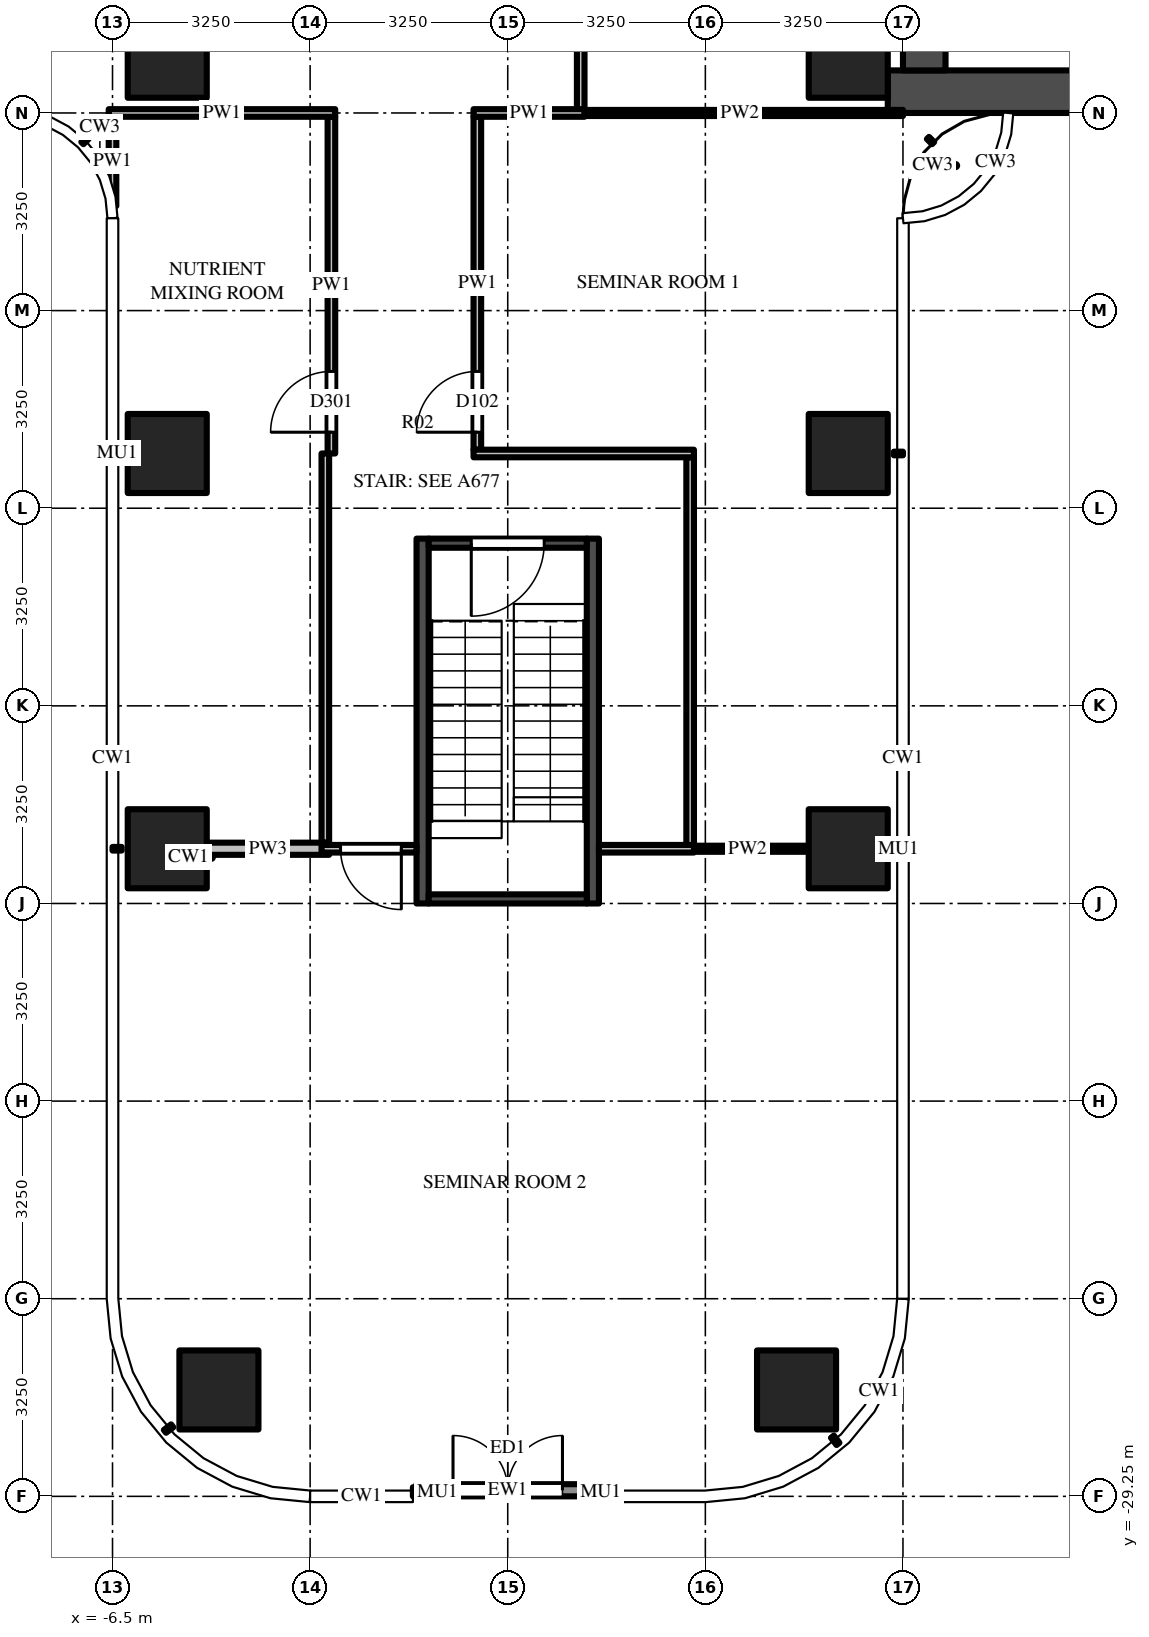
"""IFC4 building model, lengths in metres.
Left out: names, types, materials, properties, quantities, classifications, styles, units other than length and angle.
Written with IfcOpenShell. Run it as: python <this file> out.ifc"""

import sys

from ifc_helpers import new_model, si_unit, direction, frame, frame_2d, origin, origin_2d, place, context, subcontext, project, spatial, rectangle, extrude, source, transform, mapped, element, fill, save


model = new_model("IFC4")
c1 = context("Model", 3, precision=1e-05, world=origin(), true_north=direction((0.0, 1.0)))
c2 = subcontext(c1, "Body", "Model", "MODEL_VIEW")
j1 = project(units=[si_unit("LENGTHUNIT", "METRE"), si_unit("PLANEANGLEUNIT", "RADIAN")], contexts=[c1])
p1 = place(None, origin())
s1 = spatial("IfcSite", under=j1, at=p1, CompositionType="ELEMENT")
p2 = place(p1, origin())
s2 = spatial("IfcBuilding", under=s1, at=p2, CompositionType="ELEMENT")
p3 = place(p2, frame((0.0, 0.0, 97.5)))
s3 = spatial("IfcBuildingStorey", under=s2, at=p3, CompositionType="ELEMENT", Elevation=97.5)
m1 = source(origin(), c2, "Body", "SweptSolid", [
    extrude(rectangle(XDim=1.3, YDim=1.3, at=origin_2d()), origin(), (0.0, 0.0, 1.0), 4.5),
])
for number, where, z_axis, x_axis in (
    (1, (5.6, -5.6, 0.0), (0.0, 0.0, 1.0), (1.0, 0.0, 0.0)),
    (2, (-5.6, -5.6, 0.0), (0.0, 0.0, 1.0), (1.0, 0.0, 0.0)),
    (3, (5.6, -12.1, 0.0), (0.0, 0.0, 1.0), (1.0, 0.0, 0.0)),
    (4, (5.6, -18.6, 0.0), (0.0, 0.0, 1.0), (1.0, 0.0, 0.0)),
    (5, (4.75, -27.5, 0.0), (0.0, 0.0, 1.0), (1.0, 0.0, 0.0)),
    (6, (-5.6, -12.1, 0.0), (0.0, 0.0, 1.0), (1.0, 0.0, 0.0)),
    (7, (-5.6, -18.6, 0.0), (0.0, 0.0, 1.0), (1.0, 0.0, 0.0)),
    (8, (-4.75, -27.5, 0.0), (0.0, 0.0, 1.0), (1.0, 0.0, 0.0)),
):
    element("IfcColumn", number, at=place(p3, frame(where, z_axis=z_axis, x_axis=x_axis)), inside=s3, PredefinedType="COLUMN", context=c2, shape_type="MappedRepresentation", body=[
        mapped(m1, transform((0.0, 0.0, 0.0))),
    ])
m2 = source(origin(), c2, "Body", "SweptSolid", [
    extrude(rectangle(XDim=16.5, YDim=0.7, at=frame_2d((8.25, 0.0))), origin(), (0.0, 0.0, 1.0), 4.25),
])
p4 = place(p3, frame((6.25, -6.15, 0.0), z_axis=(0.0, 0.0, 1.0), x_axis=(1.0, 0.0, 0.0)))
e9 = element("IfcWall", 9, at=p4, inside=s3, PredefinedType="SHEAR", context=c2, shape_type="MappedRepresentation", body=[
    mapped(m2, transform((0.0, 0.0, 0.0))),
])
m3 = source(origin(), c2, "Body", "SweptSolid", [
    extrude(rectangle(XDim=9.05, YDim=0.7, at=frame_2d((4.525, 0.0))), origin(), (0.0, 0.0, 1.0), 4.25),
])
p5 = place(p3, frame((6.85, -5.8, 0.0), z_axis=(0.0, 0.0, 1.0), x_axis=(0.0, 1.0, 0.0)))
e10 = element("IfcWall", 10, at=p5, inside=s3, PredefinedType="SHEAR", context=c2, shape_type="MappedRepresentation", body=[
    mapped(m3, transform((0.0, 0.0, 0.0))),
])
m4 = source(origin(), c2, "Body", "SweptSolid", [
    extrude(rectangle(XDim=1.8, YDim=2.1, at=frame_2d((0.9, 1.05))), frame((0.0, 0.36, 0.0), z_axis=(0.0, -1.0, 0.0), x_axis=(1.0, 0.0, 0.0)), (0.0, 0.0, 1.0), 0.72),
])
p6 = place(p5, frame((3.15, 0.0, 0.0)))
e11 = element("IfcOpeningElement", 11, at=p6, cuts=e10, PredefinedType="OPENING", context=c2, shape_type="MappedRepresentation", body=[
    mapped(m4, transform((0.0, 0.0, 0.0))),
])
m5 = source(origin(), c2, "Body", "SweptSolid", [
    extrude(rectangle(XDim=6.0, YDim=0.2, at=frame_2d((3.0, 0.0))), origin(), (0.0, 0.0, 1.0), 4.25),
])
for number, where, z_axis, x_axis in (
    (12, (1.4, -13.5, 0.0), (0.0, 0.0, 1.0), (0.0, -1.0, 0.0)),
    (13, (-1.4, -13.5, 0.0), (0.0, 0.0, 1.0), (0.0, -1.0, 0.0)),
):
    element("IfcWall", number, at=place(p3, frame(where, z_axis=z_axis, x_axis=x_axis)), inside=s3, PredefinedType="SHEAR", context=c2, shape_type="MappedRepresentation", body=[
        mapped(m5, transform((0.0, 0.0, 0.0))),
    ])
m6 = source(origin(), c2, "Body", "SweptSolid", [
    extrude(rectangle(XDim=2.6, YDim=0.15, at=frame_2d((1.3, 0.0))), origin(), (0.0, 0.0, 1.0), 4.25),
])
p7 = place(p3, frame((1.3, -13.575, 0.0), z_axis=(0.0, 0.0, 1.0), x_axis=(-1.0, 0.0, 0.0)))
e14 = element("IfcWall", 14, at=p7, inside=s3, PredefinedType="SHEAR", context=c2, shape_type="MappedRepresentation", body=[
    mapped(m6, transform((0.0, 0.0, 0.0))),
])
m7 = source(origin(), c2, "Body", "SweptSolid", [
    extrude(rectangle(XDim=1.2, YDim=2.1, at=frame_2d((0.6, 1.05))), frame((0.0, 0.085, 0.0), z_axis=(0.0, -1.0, 0.0), x_axis=(1.0, 0.0, 0.0)), (0.0, 0.0, 1.0), 0.17),
])
p8 = place(p7, frame((0.7, 0.0, 0.0)))
e15 = element("IfcOpeningElement", 15, at=p8, cuts=e14, PredefinedType="OPENING", context=c2, shape_type="MappedRepresentation", body=[
    mapped(m7, transform((0.0, 0.0, 0.0))),
])
p9 = place(p3, frame((1.3, -19.425, 0.0), z_axis=(0.0, 0.0, 1.0), x_axis=(-1.0, 0.0, 0.0)))
e16 = element("IfcWall", 16, at=p9, inside=s3, PredefinedType="SHEAR", context=c2, shape_type="MappedRepresentation", body=[
    mapped(m6, transform((0.0, 0.0, 0.0))),
])
m8 = source(origin(), c2, "Body", "SweptSolid", [
    extrude(rectangle(XDim=3.0, YDim=0.2, at=frame_2d((1.5, 0.0))), origin(), (0.0, 0.0, 1.0), 4.25),
])
p10 = place(p3, frame((-1.5, -29.15, 0.0), z_axis=(0.0, 0.0, 1.0), x_axis=(1.0, 0.0, 0.0)))
e17 = element("IfcWall", 17, at=p10, inside=s3, PredefinedType="SOLIDWALL", context=c2, shape_type="MappedRepresentation", body=[
    mapped(m8, transform((0.0, 0.0, 0.0))),
])
m9 = source(origin(), c2, "Body", "SweptSolid", [
    extrude(rectangle(XDim=1.8, YDim=2.4, at=frame_2d((0.9, 1.2))), frame((0.0, 0.11, 0.0), z_axis=(0.0, -1.0, 0.0), x_axis=(1.0, 0.0, 0.0)), (0.0, 0.0, 1.0), 0.22),
])
p11 = place(p10, frame((0.6, 0.0, 0.0)))
e18 = element("IfcOpeningElement", 18, at=p11, cuts=e17, PredefinedType="OPENING", context=c2, shape_type="MappedRepresentation", body=[
    mapped(m9, transform((0.0, 0.0, 0.0))),
])
m10 = source(origin(), c2, "Body", "SweptSolid", [
    extrude(rectangle(XDim=1.469, YDim=0.125, at=frame_2d((0.734, 0.0))), origin(), (0.0, 0.0, 1.0), 4.25),
])
p12 = place(p3, frame((-6.5, -6.562, 0.0), z_axis=(0.0, 0.0, 1.0), x_axis=(0.0, -1.0, 0.0)))
e19 = element("IfcWall", 19, at=p12, inside=s3, PredefinedType="PARTITIONING", context=c2, shape_type="MappedRepresentation", body=[
    mapped(m10, transform((0.0, 0.0, 0.0))),
])
m11 = source(origin(), c2, "Body", "SweptSolid", [
    extrude(rectangle(XDim=6.4, YDim=0.125, at=frame_2d((3.2, 0.0))), origin(), (0.0, 0.0, 1.0), 3.468),
])
p13 = place(p3, frame((-3.0, -18.5, 0.0), z_axis=(0.0, 0.0, 1.0), x_axis=(0.0, 1.0, 0.0)))
e20 = element("IfcWall", 20, at=p13, inside=s3, PredefinedType="PARTITIONING", context=c2, shape_type="MappedRepresentation", body=[
    mapped(m11, transform((0.0, 0.0, 0.0))),
])
m12 = source(origin(), c2, "Body", "SweptSolid", [
    extrude(rectangle(XDim=5.538, YDim=0.125, at=frame_2d((2.769, 0.0))), origin(), (0.0, 0.0, 1.0), 3.468),
])
p14 = place(p3, frame((-2.9, -12.1, 0.0), z_axis=(0.0, 0.0, 1.0), x_axis=(0.0, 1.0, 0.0)))
e21 = element("IfcWall", 21, at=p14, inside=s3, PredefinedType="PARTITIONING", context=c2, shape_type="MappedRepresentation", body=[
    mapped(m12, transform((0.0, 0.0, 0.0))),
])
m13 = source(origin(), c2, "Body", "SweptSolid", [
    extrude(rectangle(XDim=1.0, YDim=2.1, at=frame_2d((0.5, 1.05))), frame((0.0, 0.073, 0.0), z_axis=(0.0, -1.0, 0.0), x_axis=(1.0, 0.0, 0.0)), (0.0, 0.0, 1.0), 0.145),
])
p15 = place(p14, frame((0.35, 0.0, 0.0)))
e22 = element("IfcOpeningElement", 22, at=p15, cuts=e21, PredefinedType="OPENING", context=c2, shape_type="MappedRepresentation", body=[
    mapped(m13, transform((0.0, 0.0, 0.0))),
])
m14 = source(origin(), c2, "Body", "SweptSolid", [
    extrude(rectangle(XDim=5.475, YDim=0.125, at=frame_2d((2.738, 0.0))), origin(), (0.0, 0.0, 1.0), 3.468),
])
p16 = place(p3, frame((-0.5, -12.038, 0.0), z_axis=(0.0, 0.0, 1.0), x_axis=(0.0, 1.0, 0.0)))
e23 = element("IfcWall", 23, at=p16, inside=s3, PredefinedType="PARTITIONING", context=c2, shape_type="MappedRepresentation", body=[
    mapped(m14, transform((0.0, 0.0, 0.0))),
])
p17 = place(p16, frame((0.288, 0.0, 0.0)))
e24 = element("IfcOpeningElement", 24, at=p17, cuts=e23, PredefinedType="OPENING", context=c2, shape_type="MappedRepresentation", body=[
    mapped(m13, transform((0.0, 0.0, 0.0))),
])
m15 = source(origin(), c2, "Body", "SweptSolid", [
    extrude(rectangle(XDim=3.137, YDim=0.125, at=frame_2d((1.569, 0.0))), origin(), (0.0, 0.0, 1.0), 3.468),
])
p18 = place(p3, frame((1.2, -3.312, 0.0), z_axis=(0.0, 0.0, 1.0), x_axis=(0.0, -1.0, 0.0)))
e25 = element("IfcWall", 25, at=p18, inside=s3, PredefinedType="PARTITIONING", context=c2, shape_type="MappedRepresentation", body=[
    mapped(m15, transform((0.0, 0.0, 0.0))),
])
m16 = source(origin(), c2, "Body", "SweptSolid", [
    extrude(rectangle(XDim=6.387, YDim=0.125, at=frame_2d((3.194, 0.0))), origin(), (0.0, 0.0, 1.0), 3.468),
])
p19 = place(p3, frame((3.0, -12.163, 0.0), z_axis=(0.0, 0.0, 1.0), x_axis=(0.0, -1.0, 0.0)))
e26 = element("IfcWall", 26, at=p19, inside=s3, PredefinedType="PARTITIONING", context=c2, shape_type="MappedRepresentation", body=[
    mapped(m16, transform((0.0, 0.0, 0.0))),
])
m17 = source(origin(), c2, "Body", "SweptSolid", [
    extrude(rectangle(XDim=2.012, YDim=0.2, at=frame_2d((1.006, 0.0))), origin(), (0.0, 0.0, 1.0), 3.697),
])
p20 = place(p3, frame((-4.95, -18.6, 0.0), z_axis=(0.0, 0.0, 1.0), x_axis=(1.0, 0.0, 0.0)))
e27 = element("IfcWall", 27, at=p20, inside=s3, PredefinedType="PARTITIONING", context=c2, shape_type="MappedRepresentation", body=[
    mapped(m17, transform((0.0, 0.0, 0.0))),
])
m18 = source(origin(), c2, "Body", "SweptSolid", [
    extrude(rectangle(XDim=2.012, YDim=0.1, at=frame_2d((1.006, 0.0))), origin(), (0.0, 0.0, 1.0), 3.697),
])
p21 = place(p3, frame((2.938, -18.6, 0.0), z_axis=(0.0, 0.0, 1.0), x_axis=(1.0, 0.0, 0.0)))
e28 = element("IfcWall", 28, at=p21, inside=s3, PredefinedType="PARTITIONING", context=c2, shape_type="MappedRepresentation", body=[
    mapped(m18, transform((0.0, 0.0, 0.0))),
])
m19 = source(origin(), c2, "Body", "SweptSolid", [
    extrude(rectangle(XDim=1.562, YDim=0.125, at=frame_2d((0.781, 0.0))), origin(), (0.0, 0.0, 1.0), 3.697),
])
p22 = place(p3, frame((-1.5, -18.6, 0.0), z_axis=(0.0, 0.0, 1.0), x_axis=(-1.0, 0.0, 0.0)))
e29 = element("IfcWall", 29, at=p22, inside=s3, PredefinedType="PARTITIONING", context=c2, shape_type="MappedRepresentation", body=[
    mapped(m19, transform((0.0, 0.0, 0.0))),
])
p23 = place(p22, frame((0.25, 0.0, 0.0)))
e30 = element("IfcOpeningElement", 30, at=p23, cuts=e29, PredefinedType="OPENING", context=c2, shape_type="MappedRepresentation", body=[
    mapped(m13, transform((0.0, 0.0, 0.0))),
])
p24 = place(p3, frame((3.062, -18.6, 0.0), z_axis=(0.0, 0.0, 1.0), x_axis=(-1.0, 0.0, 0.0)))
e31 = element("IfcWall", 31, at=p24, inside=s3, PredefinedType="PARTITIONING", context=c2, shape_type="MappedRepresentation", body=[
    mapped(m19, transform((0.0, 0.0, 0.0))),
])
m20 = source(origin(), c2, "Body", "SweptSolid", [
    extrude(rectangle(XDim=3.625, YDim=0.125, at=frame_2d((1.812, 0.0))), origin(), (0.0, 0.0, 1.0), 3.468),
])
p25 = place(p3, frame((-0.562, -12.1, 0.0), z_axis=(0.0, 0.0, 1.0), x_axis=(1.0, 0.0, 0.0)))
e32 = element("IfcWall", 32, at=p25, inside=s3, PredefinedType="PARTITIONING", context=c2, shape_type="MappedRepresentation", body=[
    mapped(m20, transform((0.0, 0.0, 0.0))),
])
m21 = source(origin(), c2, "Body", "SweptSolid", [
    extrude(rectangle(XDim=5.363, YDim=0.1, at=frame_2d((2.681, 0.0))), origin(), (0.0, 0.0, 1.0), 3.33),
])
p26 = place(p3, frame((1.137, -6.5, 0.0), z_axis=(0.0, 0.0, 1.0), x_axis=(1.0, 0.0, 0.0)))
e33 = element("IfcWall", 33, at=p26, inside=s3, PredefinedType="PARTITIONING", context=c2, shape_type="MappedRepresentation", body=[
    mapped(m21, transform((0.0, 0.0, 0.0))),
])
m22 = source(origin(), c2, "Body", "SweptSolid", [
    extrude(rectangle(XDim=3.725, YDim=0.125, at=frame_2d((1.863, 0.0))), origin(), (0.0, 0.0, 1.0), 3.33),
])
p27 = place(p3, frame((-2.837, -6.5, 0.0), z_axis=(0.0, 0.0, 1.0), x_axis=(-1.0, 0.0, 0.0)))
e34 = element("IfcWall", 34, at=p27, inside=s3, PredefinedType="PARTITIONING", context=c2, shape_type="MappedRepresentation", body=[
    mapped(m22, transform((0.0, 0.0, 0.0))),
])
m23 = source(origin(), c2, "Body", "SweptSolid", [
    extrude(rectangle(XDim=1.825, YDim=0.125, at=frame_2d((0.913, 0.0))), origin(), (0.0, 0.0, 1.0), 4.25),
])
p28 = place(p3, frame((1.262, -6.5, 0.0), z_axis=(0.0, 0.0, 1.0), x_axis=(-1.0, 0.0, 0.0)))
e35 = element("IfcWall", 35, at=p28, inside=s3, PredefinedType="PARTITIONING", context=c2, shape_type="MappedRepresentation", body=[
    mapped(m23, transform((0.0, 0.0, 0.0))),
])
m24 = source(origin(), c2, "Body", "SweptSolid", [
    extrude(rectangle(XDim=1.2, YDim=2.1, at=frame_2d((0.6, 1.05))), frame((0.0, 0.025, 0.0), z_axis=(0.0, -1.0, 0.0), x_axis=(1.0, 0.0, 0.0)), (0.0, 0.0, 1.0), 0.05),
])
p29 = place(p8, origin())
e36 = element("IfcDoor", 36, at=p29, inside=s3, OperationType="SINGLE_SWING_RIGHT", PredefinedType="DOOR", context=c2, shape_type="MappedRepresentation", body=[
    mapped(m24, transform((0.0, 0.0, 0.0))),
])
fill(e15, e36)
m25 = source(origin(), c2, "Body", "SweptSolid", [
    extrude(rectangle(XDim=1.8, YDim=2.4, at=frame_2d((0.9, 1.2))), frame((0.0, 0.025, 0.0), z_axis=(0.0, -1.0, 0.0), x_axis=(1.0, 0.0, 0.0)), (0.0, 0.0, 1.0), 0.05),
])
p30 = place(p11, origin())
e37 = element("IfcDoor", 37, at=p30, inside=s3, OperationType="DOUBLE_DOOR_SINGLE_SWING", PredefinedType="DOOR", context=c2, shape_type="MappedRepresentation", body=[
    mapped(m25, transform((0.0, 0.0, 0.0))),
])
fill(e18, e37)
m26 = source(origin(), c2, "Body", "SweptSolid", [
    extrude(rectangle(XDim=1.0, YDim=2.1, at=frame_2d((0.5, 1.05))), frame((0.0, 0.025, 0.0), z_axis=(0.0, -1.0, 0.0), x_axis=(1.0, 0.0, 0.0)), (0.0, 0.0, 1.0), 0.05),
])
p31 = place(p23, origin())
e38 = element("IfcDoor", 38, at=p31, inside=s3, OperationType="SINGLE_SWING_LEFT", PredefinedType="DOOR", context=c2, shape_type="MappedRepresentation", body=[
    mapped(m26, transform((0.0, 0.0, 0.0))),
])
fill(e30, e38)
p32 = place(p15, origin())
e39 = element("IfcDoor", 39, at=p32, inside=s3, OperationType="SINGLE_SWING_LEFT", PredefinedType="DOOR", context=c2, shape_type="MappedRepresentation", body=[
    mapped(m26, transform((0.0, 0.0, 0.0))),
])
fill(e22, e39)
p33 = place(p17, origin())
e40 = element("IfcDoor", 40, at=p33, inside=s3, OperationType="SINGLE_SWING_LEFT", PredefinedType="DOOR", context=c2, shape_type="MappedRepresentation", body=[
    mapped(m26, transform((0.0, 0.0, 0.0))),
])
fill(e24, e40)
save(model, sys.argv[1])
